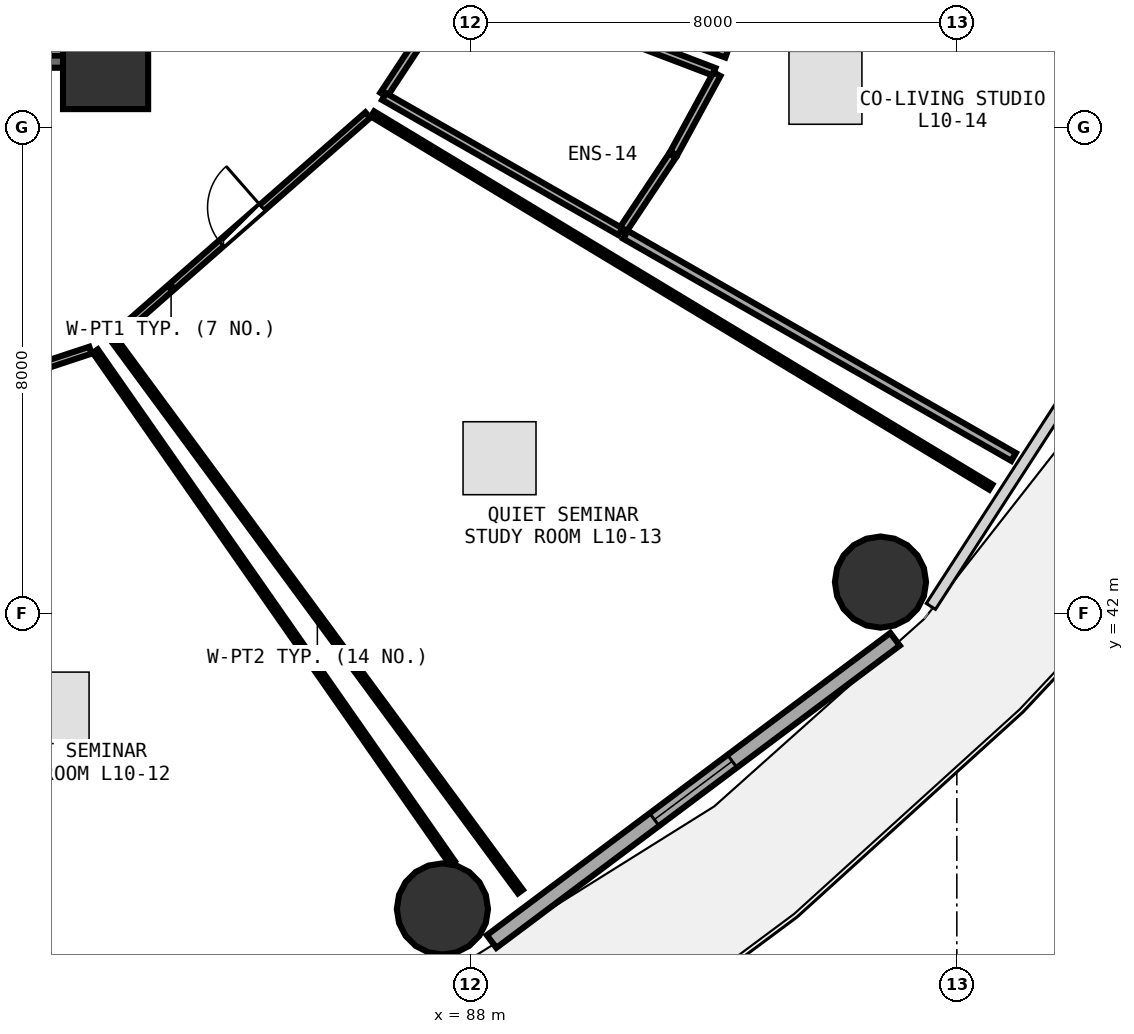
"""IFC4 building model, lengths in metres.
Left out: names, types, materials, properties, quantities, classifications, styles, units other than length and angle.
Written with IfcOpenShell. Run it as: python <this file> out.ifc"""

import sys

from ifc_helpers import new_model, si_unit, direction, frame, frame_2d, origin, origin_2d, place, context, subcontext, project, spatial, rectangle, circle, extrude, element, fill, save


model = new_model("IFC4")
c1 = context("Model", 3, precision=1e-05, world=origin(), true_north=direction((0.0, 1.0)))
c2 = subcontext(c1, "Body", "Model", "MODEL_VIEW")
j1 = project(units=[si_unit("LENGTHUNIT", "METRE"), si_unit("PLANEANGLEUNIT", "RADIAN")], contexts=[c1])
p1 = place(None, origin())
s1 = spatial("IfcSite", under=j1, at=p1, CompositionType="ELEMENT")
p2 = place(p1, origin())
s2 = spatial("IfcBuilding", under=s1, at=p2, CompositionType="ELEMENT")
p3 = place(p2, frame((0.0, 0.0, 41.25)))
s3 = spatial("IfcBuildingStorey", under=s2, at=p3, CompositionType="ELEMENT", Elevation=41.25)
p4 = place(p3, frame((82.0, 51.0, 0.0), z_axis=(0.0, 0.0, 1.0), x_axis=(1.0, 0.0, 0.0)))
e1 = element("IfcColumn", 1, at=p4, inside=s3, PredefinedType="PILASTER", context=c2, shape_type="SweptSolid", body=[
    extrude(rectangle(XDim=1.4, YDim=1.4, at=origin_2d()), origin(), (0.0, 0.0, 1.0), 3.75),
])
for number, where, z_axis, x_axis in (
    (2, (87.54, 37.146, 0.0), (0.0, 0.0, 1.0), (1.0, 0.0, 0.0)),
    (3, (94.744, 42.522, 0.0), (0.0, 0.0, 1.0), (1.0, 0.0, 0.0)),
):
    element("IfcColumn", number, at=place(p3, frame(where, z_axis=z_axis, x_axis=x_axis)), inside=s3, PredefinedType="COLUMN", context=c2, shape_type="SweptSolid", body=[
        extrude(circle(Radius=0.75, at=origin_2d()), origin(), (0.0, 0.0, 1.0), 3.75),
    ])
p5 = place(p3, frame((88.349, 36.611, 0.0), z_axis=(0.0, 0.0, 1.0), x_axis=(0.80030733173, 0.599590005569, 0.0)))
e4 = element("IfcWall", 4, at=p5, inside=s3, PredefinedType="SOLIDWALL", context=c2, shape_type="SweptSolid", body=[
    extrude(rectangle(XDim=8.291, YDim=0.26, at=frame_2d((4.145, 0.0))), origin(), (0.0, 0.0, 1.0), 3.475),
])
p6 = place(p5, frame((3.345, 0.0, 0.85)))
e5 = element("IfcOpeningElement", 5, at=p6, cuts=e4, PredefinedType="OPENING", context=c2, shape_type="SweptSolid", body=[
    extrude(rectangle(XDim=1.6, YDim=1.45, at=frame_2d((0.8, 0.725))), frame((0.0, 0.14, 0.0), z_axis=(0.0, -1.0, 0.0), x_axis=(1.0, 0.0, 0.0)), (0.0, 0.0, 1.0), 0.28),
])
p7 = place(p3, frame((74.0, 51.08, 0.0), z_axis=(0.0, 0.0, 1.0), x_axis=(1.0, 0.0, 0.0)))
e6 = element("IfcWall", 6, at=p7, inside=s3, PredefinedType="SHEAR", context=c2, shape_type="SweptSolid", body=[
    extrude(rectangle(XDim=7.9, YDim=0.2, at=frame_2d((3.95, 0.0))), origin(), (0.0, 0.0, 1.0), 3.49),
])
p8 = place(p7, frame((1.12, 0.0, 0.0)))
e7 = element("IfcOpeningElement", 7, at=p8, cuts=e6, PredefinedType="OPENING", context=c2, shape_type="SweptSolid", body=[
    extrude(rectangle(XDim=1.05, YDim=2.1, at=frame_2d((0.525, 1.05))), frame((0.0, 0.11, 0.0), z_axis=(0.0, -1.0, 0.0), x_axis=(1.0, 0.0, 0.0)), (0.0, 0.0, 1.0), 0.22),
])
p9 = place(p3, frame((82.02, 51.2, 0.0), z_axis=(0.0, 0.0, 1.0), x_axis=(0.0, 1.0, 0.0)))
e8 = element("IfcWall", 8, at=p9, inside=s3, PredefinedType="SHEAR", context=c2, shape_type="SweptSolid", body=[
    extrude(rectangle(XDim=3.07, YDim=0.2, at=frame_2d((1.535, 0.0))), origin(), (0.0, 0.0, 1.0), 3.49),
])
p10 = place(p3, frame((76.33, 44.546, 0.0), z_axis=(0.0, 0.0, 1.0), x_axis=(0.949607265123, 0.313442246716, 0.0)))
e9 = element("IfcWall", 9, at=p10, inside=s3, PredefinedType="PARTITIONING", context=c2, shape_type="SweptSolid", body=[
    extrude(rectangle(XDim=5.708, YDim=0.12, at=frame_2d((2.854, 0.0))), origin(), (0.0, 0.0, 1.0), 2.875),
])
p11 = place(p10, frame((2.404, 0.0, 0.0)))
e10 = element("IfcOpeningElement", 10, at=p11, cuts=e9, PredefinedType="OPENING", context=c2, shape_type="SweptSolid", body=[
    extrude(rectangle(XDim=0.9, YDim=2.08, at=frame_2d((0.45, 1.04))), frame((0.0, 0.07, 0.0), z_axis=(0.0, -1.0, 0.0), x_axis=(1.0, 0.0, 0.0)), (0.0, 0.0, 1.0), 0.14),
])
p12 = place(p3, frame((82.165, 46.57, 0.0), z_axis=(0.0, 0.0, 1.0), x_axis=(0.752285806045, 0.658836903963, 0.0)))
e11 = element("IfcWall", 11, at=p12, inside=s3, PredefinedType="PARTITIONING", context=c2, shape_type="SweptSolid", body=[
    extrude(rectangle(XDim=5.512, YDim=0.12, at=frame_2d((2.756, 0.0))), origin(), (0.0, 0.0, 1.0), 2.875),
])
p13 = place(p12, frame((2.306, 0.0, 0.0)))
e12 = element("IfcOpeningElement", 12, at=p13, cuts=e11, PredefinedType="OPENING", context=c2, shape_type="SweptSolid", body=[
    extrude(rectangle(XDim=0.9, YDim=2.08, at=frame_2d((0.45, 1.04))), frame((0.0, 0.07, 0.0), z_axis=(0.0, -1.0, 0.0), x_axis=(1.0, 0.0, 0.0)), (0.0, 0.0, 1.0), 0.14),
])
p14 = place(p3, frame((87.823, 52.51, 0.0), z_axis=(0.0, 0.0, 1.0), x_axis=(0.934413446892, -0.356190272562, 0.0)))
e13 = element("IfcWall", 13, at=p14, inside=s3, PredefinedType="PLUMBINGWALL", context=c2, shape_type="SweptSolid", body=[
    extrude(rectangle(XDim=4.479, YDim=0.13, at=frame_2d((2.239, 0.0))), origin(), (0.0, 0.0, 1.0), 3.235),
])
p15 = place(p14, frame((1.809, 0.0, 0.0)))
e14 = element("IfcOpeningElement", 14, at=p15, cuts=e13, PredefinedType="OPENING", context=c2, shape_type="SweptSolid", body=[
    extrude(rectangle(XDim=0.86, YDim=2.05, at=frame_2d((0.43, 1.025))), frame((0.0, 0.075, 0.0), z_axis=(0.0, -1.0, 0.0), x_axis=(1.0, 0.0, 0.0)), (0.0, 0.0, 1.0), 0.15),
])
p16 = place(p3, frame((81.831, 46.321, 0.0), z_axis=(0.0, 0.0, 1.0), x_axis=(0.572190897837, -0.820120464586, 0.0)))
e15 = element("IfcWall", 15, at=p16, inside=s3, PredefinedType="PARTITIONING", context=c2, shape_type="SweptSolid", body=[
    extrude(rectangle(XDim=10.264, YDim=0.1, at=frame_2d((5.132, 0.0))), origin(), (0.0, 0.0, 1.0), 2.875),
])
p17 = place(p3, frame((86.391, 50.22, 0.0), z_axis=(0.0, 0.0, 1.0), x_axis=(0.856195030458, -0.516652755551, 0.0)))
e16 = element("IfcWall", 16, at=p17, inside=s3, PredefinedType="PARTITIONING", context=c2, shape_type="SweptSolid", body=[
    extrude(rectangle(XDim=11.875, YDim=0.1, at=frame_2d((5.938, 0.0))), origin(), (0.0, 0.0, 1.0), 2.875),
])
p18 = place(p3, frame((88.822, 37.432, 0.0), z_axis=(0.0, 0.0, 1.0), x_axis=(-0.593112501052, 0.805119594281, 0.0)))
e17 = element("IfcWall", 17, at=p18, inside=s3, PredefinedType="PARTITIONING", context=c2, shape_type="SweptSolid", body=[
    extrude(rectangle(XDim=11.26, YDim=0.1, at=frame_2d((5.63, 0.0))), origin(), (0.0, 0.0, 1.0), 2.875),
])
p19 = place(p3, frame((86.573, 50.534, 0.0), z_axis=(0.0, 0.0, 1.0), x_axis=(0.550537530442, 0.834810414151, 0.0)))
e18 = element("IfcWall", 18, at=p19, inside=s3, PredefinedType="PLUMBINGWALL", context=c2, shape_type="SweptSolid", body=[
    extrude(rectangle(XDim=1.139, YDim=0.13, at=frame_2d((0.569, 0.0))), origin(), (0.0, 0.0, 1.0), 2.875),
])
p20 = place(p3, frame((92.054, 50.875, 0.0), z_axis=(0.0, 0.0, 1.0), x_axis=(-0.47818376891, -0.878259803903, 0.0)))
e19 = element("IfcWall", 19, at=p20, inside=s3, PredefinedType="PLUMBINGWALL", context=c2, shape_type="SweptSolid", body=[
    extrude(rectangle(XDim=1.485, YDim=0.13, at=frame_2d((0.742, 0.0))), origin(), (0.0, 0.0, 1.0), 2.875),
])
p21 = place(p3, frame((91.324, 49.537, 0.0), z_axis=(0.0, 0.0, 1.0), x_axis=(-0.554361413566, -0.832276049847, 0.0)))
e20 = element("IfcWall", 20, at=p21, inside=s3, PredefinedType="PLUMBINGWALL", context=c2, shape_type="SweptSolid", body=[
    extrude(rectangle(XDim=1.497, YDim=0.13, at=frame_2d((0.749, 0.0))), origin(), (0.0, 0.0, 1.0), 3.48),
])
p22 = place(p3, frame((90.466, 48.285, 0.0), z_axis=(0.0, 0.0, 1.0), x_axis=(-0.868102152808, 0.496385588319, 0.0)))
e21 = element("IfcWall", 21, at=p22, inside=s3, PredefinedType="PLUMBINGWALL", context=c2, shape_type="SweptSolid", body=[
    extrude(rectangle(XDim=4.477, YDim=0.13, at=frame_2d((2.238, 0.0))), origin(), (0.0, 0.0, 1.0), 2.875),
])
p23 = place(p3, frame((96.933, 44.58, 0.0), z_axis=(0.0, 0.0, 1.0), x_axis=(-0.8678833592, 0.496768029188, 0.0)))
e22 = element("IfcWall", 22, at=p23, inside=s3, PredefinedType="PARTITIONING", context=c2, shape_type="SweptSolid", body=[
    extrude(rectangle(XDim=7.354, YDim=0.15, at=frame_2d((3.677, 0.0))), origin(), (0.0, 0.0, 1.0), 2.875),
])
p24 = place(p3, frame((92.219, 51.219, 0.0), z_axis=(0.0, 0.0, 1.0), x_axis=(-0.940607228955, 0.339496746433, 0.0)))
e23 = element("IfcWall", 23, at=p24, inside=s3, PredefinedType="PARTITIONING", context=c2, shape_type="SweptSolid", body=[
    extrude(rectangle(XDim=1.868, YDim=0.15, at=frame_2d((0.934, 0.0))), origin(), (0.0, 0.0, 1.0), 3.48),
])
p25 = place(p6, origin())
e24 = element("IfcWindow", 24, at=p25, inside=s3, PartitioningType="SINGLE_PANEL", PredefinedType="WINDOW", context=c2, shape_type="SweptSolid", body=[
    extrude(rectangle(XDim=1.6, YDim=1.45, at=frame_2d((0.8, 0.725))), frame((0.0, 0.03, 0.0), z_axis=(0.0, -1.0, 0.0), x_axis=(1.0, 0.0, 0.0)), (0.0, 0.0, 1.0), 0.06),
])
fill(e5, e24)
p26 = place(p13, origin())
e25 = element("IfcDoor", 25, at=p26, inside=s3, OperationType="SINGLE_SWING_RIGHT", PredefinedType="DOOR", context=c2, shape_type="SweptSolid", body=[
    extrude(rectangle(XDim=0.9, YDim=2.08, at=frame_2d((0.45, 1.04))), frame((0.0, 0.025, 0.0), z_axis=(0.0, -1.0, 0.0), x_axis=(1.0, 0.0, 0.0)), (0.0, 0.0, 1.0), 0.05),
])
fill(e12, e25)
save(model, sys.argv[1])
